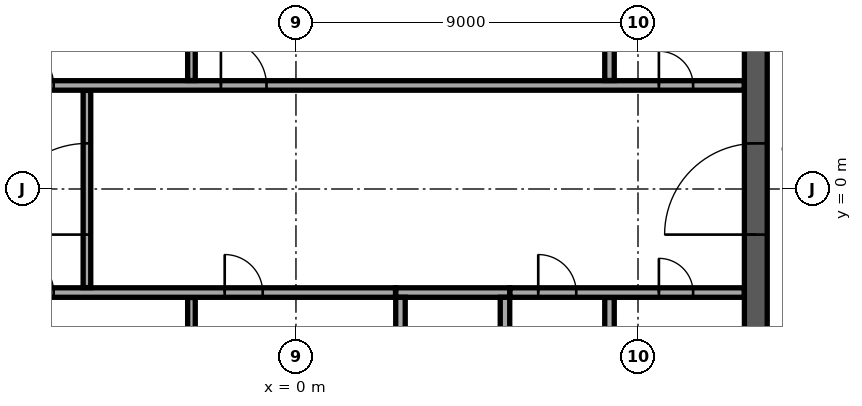
"""IFC4 building model, lengths in metres.
Left out: names, types, materials, properties, quantities, classifications, styles, units other than length and angle.
Written with IfcOpenShell. Run it as: python <this file> out.ifc"""

import sys

from ifc_helpers import new_model, si_unit, direction, frame, frame_2d, origin, place, context, subcontext, project, spatial, rectangle, extrude, element, fill, save


model = new_model("IFC4")
c1 = context("Model", 3, precision=1e-05, world=origin(), true_north=direction((0.0, 1.0)))
c2 = subcontext(c1, "Body", "Model", "MODEL_VIEW")
j1 = project(units=[si_unit("LENGTHUNIT", "METRE"), si_unit("PLANEANGLEUNIT", "RADIAN")], contexts=[c1])
p1 = place(None, origin())
s1 = spatial("IfcSite", under=j1, at=p1, CompositionType="ELEMENT")
p2 = place(p1, origin())
s2 = spatial("IfcBuilding", under=s1, at=p2, CompositionType="ELEMENT")
p3 = place(p2, frame((0.0, 0.0, 296.5)))
s3 = spatial("IfcBuildingStorey", under=s2, at=p3, CompositionType="ELEMENT", Elevation=296.5)
p4 = place(p3, frame((12.1, -11.8, 0.0), z_axis=(0.0, 0.0, 1.0), x_axis=(0.0, 1.0, 0.0)))
e1 = element("IfcWall", 1, at=p4, inside=s3, PredefinedType="SHEAR", context=c2, shape_type="SweptSolid", body=[
    extrude(rectangle(XDim=23.6, YDim=0.6, at=frame_2d((11.8, 0.0))), origin(), (0.0, 0.0, 1.0), 3.65),
])
p5 = place(p4, frame((10.6, 0.0, 0.0)))
e2 = element("IfcOpeningElement", 2, at=p5, cuts=e1, PredefinedType="OPENING", context=c2, shape_type="SweptSolid", body=[
    extrude(rectangle(XDim=2.4, YDim=2.4, at=frame_2d((1.2, 1.2))), frame((0.0, 0.31, 0.0), z_axis=(0.0, -1.0, 0.0), x_axis=(1.0, 0.0, 0.0)), (0.0, 0.0, 1.0), 0.62),
])
p6 = place(p3, frame((2.625, -2.725, 0.0), z_axis=(0.0, 0.0, 1.0), x_axis=(1.0, 0.0, 0.0)))
e3 = element("IfcWall", 3, at=p6, inside=s3, PredefinedType="SOLIDWALL", context=c2, shape_type="SweptSolid", body=[
    extrude(rectangle(XDim=3.0, YDim=0.25, at=frame_2d((1.5, 0.0))), origin(), (0.0, 0.0, 1.0), 3.65),
])
for number, where, z_axis, x_axis in (
    (4, (2.75, -5.55, 0.0), (0.0, 0.0, 1.0), (0.0, 1.0, 0.0)),
    (5, (5.5, -5.55, 0.0), (0.0, 0.0, 1.0), (0.0, 1.0, 0.0)),
):
    element("IfcWall", number, at=place(p3, frame(where, z_axis=z_axis, x_axis=x_axis)), inside=s3, PredefinedType="SOLIDWALL", context=c2, shape_type="SweptSolid", body=[
        extrude(rectangle(XDim=2.7, YDim=0.25, at=frame_2d((1.35, 0.0))), origin(), (0.0, 0.0, 1.0), 3.65),
    ])
p7 = place(p3, frame((-2.75, -5.545, 0.0), z_axis=(0.0, 0.0, 1.0), x_axis=(0.0, 1.0, 0.0)))
e6 = element("IfcWall", 6, at=p7, inside=s3, PredefinedType="PARTITIONING", context=c2, shape_type="SweptSolid", body=[
    extrude(rectangle(XDim=2.69, YDim=0.2, at=frame_2d((1.345, 0.0))), origin(), (0.0, 0.0, 1.0), 3.65),
])
p8 = place(p3, frame((8.25, -5.545, 0.0), z_axis=(0.0, 0.0, 1.0), x_axis=(0.0, 1.0, 0.0)))
e7 = element("IfcWall", 7, at=p8, inside=s3, PredefinedType="PARTITIONING", context=c2, shape_type="SweptSolid", body=[
    extrude(rectangle(XDim=2.69, YDim=0.25, at=frame_2d((1.345, 0.0))), origin(), (0.0, 0.0, 1.0), 3.65),
])
p9 = place(p3, frame((-11.795, -2.725, 0.0), z_axis=(0.0, 0.0, 1.0), x_axis=(1.0, 0.0, 0.0)))
e8 = element("IfcWall", 8, at=p9, inside=s3, PredefinedType="PARTITIONING", context=c2, shape_type="SweptSolid", body=[
    extrude(rectangle(XDim=14.415, YDim=0.25, at=frame_2d((7.208, 0.0))), origin(), (0.0, 0.0, 1.0), 3.65),
])
p10 = place(p9, frame((1.295, 0.0, 0.0)))
e9 = element("IfcOpeningElement", 9, at=p10, cuts=e8, PredefinedType="OPENING", context=c2, shape_type="SweptSolid", body=[
    extrude(rectangle(XDim=1.0, YDim=2.1, at=frame_2d((0.5, 1.05))), frame((0.0, 0.135, 0.0), z_axis=(0.0, -1.0, 0.0), x_axis=(1.0, 0.0, 0.0)), (0.0, 0.0, 1.0), 0.27),
])
p11 = place(p9, frame((4.42, 0.0, 0.0)))
e10 = element("IfcOpeningElement", 10, at=p11, cuts=e8, PredefinedType="OPENING", context=c2, shape_type="SweptSolid", body=[
    extrude(rectangle(XDim=1.0, YDim=2.1, at=frame_2d((0.5, 1.05))), frame((0.0, 0.135, 0.0), z_axis=(0.0, -1.0, 0.0), x_axis=(1.0, 0.0, 0.0)), (0.0, 0.0, 1.0), 0.27),
])
p12 = place(p9, frame((9.92, 0.0, 0.0)))
e11 = element("IfcOpeningElement", 11, at=p12, cuts=e8, PredefinedType="OPENING", context=c2, shape_type="SweptSolid", body=[
    extrude(rectangle(XDim=1.0, YDim=2.1, at=frame_2d((0.5, 1.05))), frame((0.0, 0.135, 0.0), z_axis=(0.0, -1.0, 0.0), x_axis=(1.0, 0.0, 0.0)), (0.0, 0.0, 1.0), 0.27),
])
p13 = place(p3, frame((5.63, -2.725, 0.0), z_axis=(0.0, 0.0, 1.0), x_axis=(1.0, 0.0, 0.0)))
e12 = element("IfcWall", 12, at=p13, inside=s3, PredefinedType="PARTITIONING", context=c2, shape_type="SweptSolid", body=[
    extrude(rectangle(XDim=6.165, YDim=0.25, at=frame_2d((3.083, 0.0))), origin(), (0.0, 0.0, 1.0), 3.65),
])
p14 = place(p13, frame((0.745, 0.0, 0.0)))
e13 = element("IfcOpeningElement", 13, at=p14, cuts=e12, PredefinedType="OPENING", context=c2, shape_type="SweptSolid", body=[
    extrude(rectangle(XDim=1.0, YDim=2.1, at=frame_2d((0.5, 1.05))), frame((0.0, 0.135, 0.0), z_axis=(0.0, -1.0, 0.0), x_axis=(1.0, 0.0, 0.0)), (0.0, 0.0, 1.0), 0.27),
])
p15 = place(p13, frame((3.92, 0.0, 0.0)))
e14 = element("IfcOpeningElement", 14, at=p15, cuts=e12, PredefinedType="OPENING", context=c2, shape_type="SweptSolid", body=[
    extrude(rectangle(XDim=0.9, YDim=2.1, at=frame_2d((0.45, 1.05))), frame((0.0, 0.135, 0.0), z_axis=(0.0, -1.0, 0.0), x_axis=(1.0, 0.0, 0.0)), (0.0, 0.0, 1.0), 0.27),
])
p16 = place(p3, frame((-5.5, -2.595, 0.0), z_axis=(0.0, 0.0, 1.0), x_axis=(0.0, 1.0, 0.0)))
e15 = element("IfcWall", 15, at=p16, inside=s3, PredefinedType="PARTITIONING", context=c2, shape_type="SweptSolid", body=[
    extrude(rectangle(XDim=5.19, YDim=0.2, at=frame_2d((2.595, 0.0))), origin(), (0.0, 0.0, 1.0), 3.65),
])
p17 = place(p16, frame((1.395, 0.0, 0.0)))
e16 = element("IfcOpeningElement", 16, at=p17, cuts=e15, PredefinedType="OPENING", context=c2, shape_type="SweptSolid", body=[
    extrude(rectangle(XDim=2.4, YDim=2.4, at=frame_2d((1.2, 1.2))), frame((0.0, 0.11, 0.0), z_axis=(0.0, -1.0, 0.0), x_axis=(1.0, 0.0, 0.0)), (0.0, 0.0, 1.0), 0.22),
])
p18 = place(p3, frame((-11.795, 2.725, 0.0), z_axis=(0.0, 0.0, 1.0), x_axis=(1.0, 0.0, 0.0)))
e17 = element("IfcWall", 17, at=p18, inside=s3, PredefinedType="PARTITIONING", context=c2, shape_type="SweptSolid", body=[
    extrude(rectangle(XDim=23.59, YDim=0.25, at=frame_2d((11.795, 0.0))), origin(), (0.0, 0.0, 1.0), 3.65),
])
p19 = place(p18, frame((21.345, 0.0, 0.0)))
e18 = element("IfcOpeningElement", 18, at=p19, cuts=e17, PredefinedType="OPENING", context=c2, shape_type="SweptSolid", body=[
    extrude(rectangle(XDim=0.9, YDim=2.1, at=frame_2d((0.45, 1.05))), frame((0.0, 0.135, 0.0), z_axis=(0.0, -1.0, 0.0), x_axis=(1.0, 0.0, 0.0)), (0.0, 0.0, 1.0), 0.27),
])
p20 = place(p18, frame((1.345, 0.0, 0.0)))
e19 = element("IfcOpeningElement", 19, at=p20, cuts=e17, PredefinedType="OPENING", context=c2, shape_type="SweptSolid", body=[
    extrude(rectangle(XDim=0.9, YDim=2.1, at=frame_2d((0.45, 1.05))), frame((0.0, 0.135, 0.0), z_axis=(0.0, -1.0, 0.0), x_axis=(1.0, 0.0, 0.0)), (0.0, 0.0, 1.0), 0.27),
])
p21 = place(p18, frame((4.42, 0.0, 0.0)))
e20 = element("IfcOpeningElement", 20, at=p21, cuts=e17, PredefinedType="OPENING", context=c2, shape_type="SweptSolid", body=[
    extrude(rectangle(XDim=1.0, YDim=2.1, at=frame_2d((0.5, 1.05))), frame((0.0, 0.135, 0.0), z_axis=(0.0, -1.0, 0.0), x_axis=(1.0, 0.0, 0.0)), (0.0, 0.0, 1.0), 0.27),
])
p22 = place(p18, frame((9.82, 0.0, 0.0)))
e21 = element("IfcOpeningElement", 21, at=p22, cuts=e17, PredefinedType="OPENING", context=c2, shape_type="SweptSolid", body=[
    extrude(rectangle(XDim=1.2, YDim=2.1, at=frame_2d((0.6, 1.05))), frame((0.0, 0.135, 0.0), z_axis=(0.0, -1.0, 0.0), x_axis=(1.0, 0.0, 0.0)), (0.0, 0.0, 1.0), 0.27),
])
p23 = place(p3, frame((-2.75, 2.855, 0.0), z_axis=(0.0, 0.0, 1.0), x_axis=(0.0, 1.0, 0.0)))
e22 = element("IfcWall", 22, at=p23, inside=s3, PredefinedType="PARTITIONING", context=c2, shape_type="SweptSolid", body=[
    extrude(rectangle(XDim=2.69, YDim=0.2, at=frame_2d((1.345, 0.0))), origin(), (0.0, 0.0, 1.0), 3.65),
])
p24 = place(p3, frame((8.25, 2.855, 0.0), z_axis=(0.0, 0.0, 1.0), x_axis=(0.0, 1.0, 0.0)))
e23 = element("IfcWall", 23, at=p24, inside=s3, PredefinedType="PARTITIONING", context=c2, shape_type="SweptSolid", body=[
    extrude(rectangle(XDim=2.69, YDim=0.25, at=frame_2d((1.345, 0.0))), origin(), (0.0, 0.0, 1.0), 3.65),
])
p25 = place(p5, origin())
e24 = element("IfcDoor", 24, at=p25, inside=s3, OperationType="SINGLE_SWING_LEFT", PredefinedType="DOOR", context=c2, shape_type="SweptSolid", body=[
    extrude(rectangle(XDim=2.4, YDim=2.4, at=frame_2d((1.2, 1.2))), frame((0.0, 0.025, 0.0), z_axis=(0.0, -1.0, 0.0), x_axis=(1.0, 0.0, 0.0)), (0.0, 0.0, 1.0), 0.05),
])
fill(e2, e24)
p26 = place(p14, origin())
e25 = element("IfcDoor", 25, at=p26, inside=s3, OperationType="SINGLE_SWING_LEFT", PredefinedType="DOOR", context=c2, shape_type="SweptSolid", body=[
    extrude(rectangle(XDim=1.0, YDim=2.1, at=frame_2d((0.5, 1.05))), frame((0.0, 0.025, 0.0), z_axis=(0.0, -1.0, 0.0), x_axis=(1.0, 0.0, 0.0)), (0.0, 0.0, 1.0), 0.05),
])
fill(e13, e25)
p27 = place(p19, origin())
e26 = element("IfcDoor", 26, at=p27, inside=s3, OperationType="SINGLE_SWING_LEFT", PredefinedType="DOOR", context=c2, shape_type="SweptSolid", body=[
    extrude(rectangle(XDim=0.9, YDim=2.1, at=frame_2d((0.45, 1.05))), frame((0.0, 0.025, 0.0), z_axis=(0.0, -1.0, 0.0), x_axis=(1.0, 0.0, 0.0)), (0.0, 0.0, 1.0), 0.05),
])
fill(e18, e26)
p28 = place(p15, origin())
e27 = element("IfcDoor", 27, at=p28, inside=s3, OperationType="SINGLE_SWING_LEFT", PredefinedType="DOOR", context=c2, shape_type="SweptSolid", body=[
    extrude(rectangle(XDim=0.9, YDim=2.1, at=frame_2d((0.45, 1.05))), frame((0.0, 0.025, 0.0), z_axis=(0.0, -1.0, 0.0), x_axis=(1.0, 0.0, 0.0)), (0.0, 0.0, 1.0), 0.05),
])
fill(e14, e27)
p29 = place(p21, origin())
e28 = element("IfcDoor", 28, at=p29, inside=s3, OperationType="SINGLE_SWING_LEFT", PredefinedType="DOOR", context=c2, shape_type="SweptSolid", body=[
    extrude(rectangle(XDim=1.0, YDim=2.1, at=frame_2d((0.5, 1.05))), frame((0.0, 0.025, 0.0), z_axis=(0.0, -1.0, 0.0), x_axis=(1.0, 0.0, 0.0)), (0.0, 0.0, 1.0), 0.05),
])
fill(e20, e28)
p30 = place(p22, origin())
e29 = element("IfcDoor", 29, at=p30, inside=s3, OperationType="SINGLE_SWING_LEFT", PredefinedType="DOOR", context=c2, shape_type="SweptSolid", body=[
    extrude(rectangle(XDim=1.2, YDim=2.1, at=frame_2d((0.6, 1.05))), frame((0.0, 0.025, 0.0), z_axis=(0.0, -1.0, 0.0), x_axis=(1.0, 0.0, 0.0)), (0.0, 0.0, 1.0), 0.05),
])
fill(e21, e29)
p31 = place(p11, origin())
e30 = element("IfcDoor", 30, at=p31, inside=s3, OperationType="SINGLE_SWING_LEFT", PredefinedType="DOOR", context=c2, shape_type="SweptSolid", body=[
    extrude(rectangle(XDim=1.0, YDim=2.1, at=frame_2d((0.5, 1.05))), frame((0.0, 0.025, 0.0), z_axis=(0.0, -1.0, 0.0), x_axis=(1.0, 0.0, 0.0)), (0.0, 0.0, 1.0), 0.05),
])
fill(e10, e30)
p32 = place(p12, origin())
e31 = element("IfcDoor", 31, at=p32, inside=s3, OperationType="SINGLE_SWING_LEFT", PredefinedType="DOOR", context=c2, shape_type="SweptSolid", body=[
    extrude(rectangle(XDim=1.0, YDim=2.1, at=frame_2d((0.5, 1.05))), frame((0.0, 0.025, 0.0), z_axis=(0.0, -1.0, 0.0), x_axis=(1.0, 0.0, 0.0)), (0.0, 0.0, 1.0), 0.05),
])
fill(e11, e31)
p33 = place(p17, origin())
e32 = element("IfcDoor", 32, at=p33, inside=s3, OperationType="SINGLE_SWING_LEFT", PredefinedType="DOOR", context=c2, shape_type="SweptSolid", body=[
    extrude(rectangle(XDim=2.4, YDim=2.4, at=frame_2d((1.2, 1.2))), frame((0.0, 0.025, 0.0), z_axis=(0.0, -1.0, 0.0), x_axis=(1.0, 0.0, 0.0)), (0.0, 0.0, 1.0), 0.05),
])
fill(e16, e32)
save(model, sys.argv[1])
